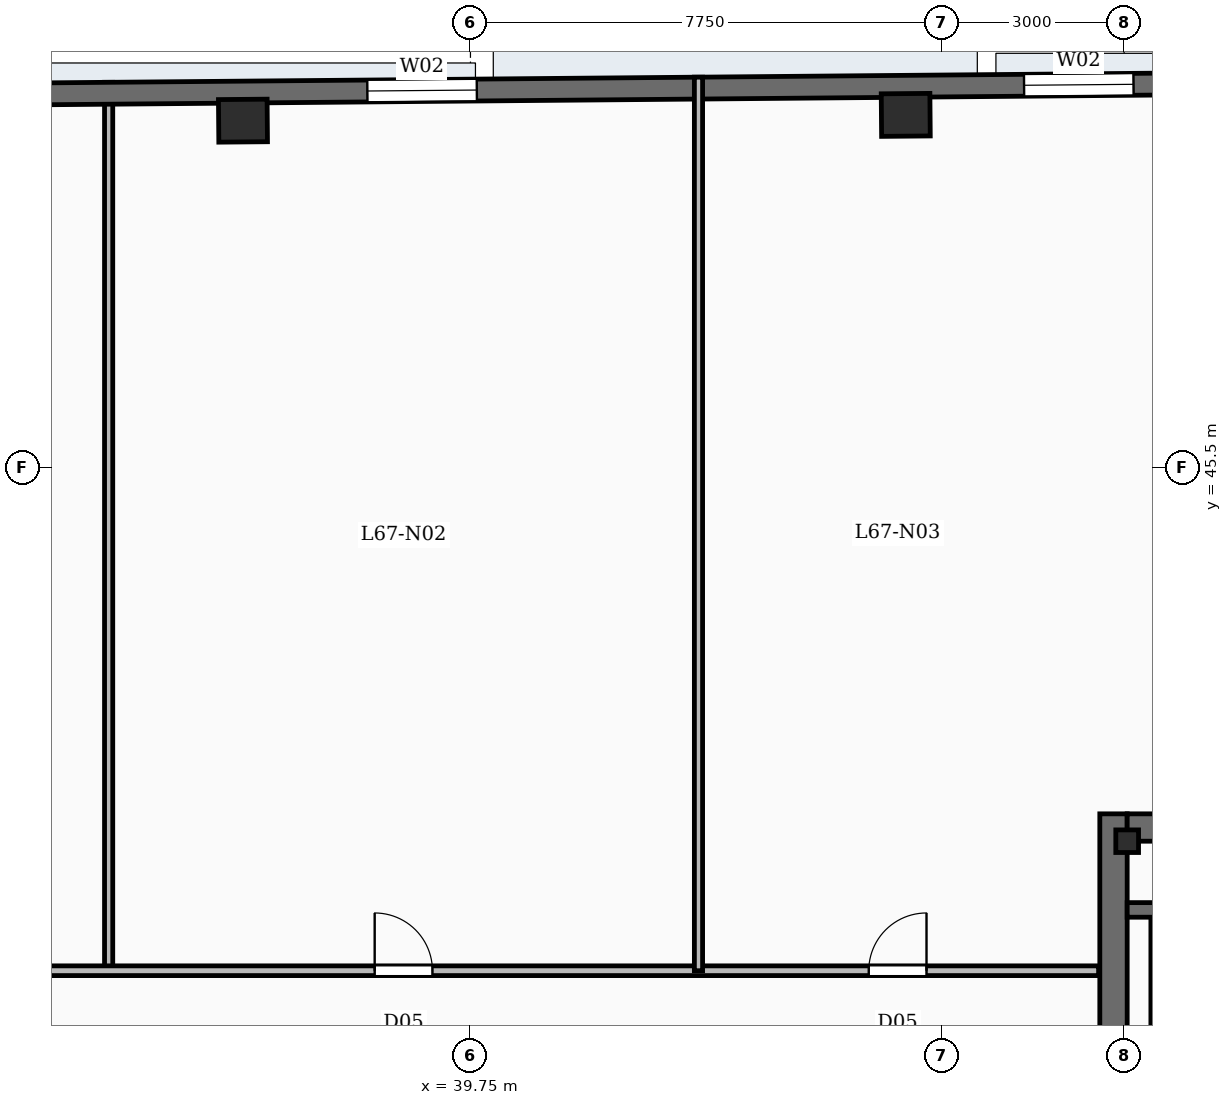
"""IFC4 building model, lengths in metres.
Left out: names, types, materials, properties, quantities, classifications, styles, units other than length and angle.
Written with IfcOpenShell. Run it as: python <this file> out.ifc"""

import sys

from ifc_helpers import new_model, si_unit, direction, frame, frame_2d, origin, origin_2d, place, context, subcontext, project, spatial, rectangle, i_section, extrude, element, fill, save


model = new_model("IFC4")
c1 = context("Model", 3, precision=1e-05, world=origin(), true_north=direction((0.0, 1.0)))
c2 = subcontext(c1, "Body", "Model", "MODEL_VIEW")
j1 = project(units=[si_unit("LENGTHUNIT", "METRE"), si_unit("PLANEANGLEUNIT", "RADIAN")], contexts=[c1])
p1 = place(None, origin())
s1 = spatial("IfcSite", under=j1, at=p1, CompositionType="ELEMENT")
p2 = place(p1, origin())
s2 = spatial("IfcBuilding", under=s1, at=p2, CompositionType="ELEMENT")
p3 = place(p2, frame((0.0, 0.0, 274.9)))
s3 = spatial("IfcBuildingStorey", under=s2, at=p3, CompositionType="ELEMENT", Elevation=274.9)
p4 = place(p3, frame((50.325, 19.0, -0.45), z_axis=(0.0, 0.0, 1.0), x_axis=(0.0, 1.0, 0.0)))
e1 = element("IfcWall", 1, at=p4, inside=s3, PredefinedType="SHEAR", context=c2, shape_type="SweptSolid", body=[
    extrude(rectangle(XDim=20.8, YDim=0.45, at=frame_2d((10.4, 0.0))), origin(), (0.0, 0.0, 1.0), 3.93),
])
p5 = place(p4, frame((2.5, 0.0, 0.45)))
e2 = element("IfcOpeningElement", 2, at=p5, cuts=e1, PredefinedType="OPENING", context=c2, shape_type="SweptSolid", body=[
    extrude(rectangle(XDim=1.05, YDim=2.15, at=frame_2d((0.525, 1.075))), frame((0.0, 0.235, 0.0), z_axis=(0.0, -1.0, 0.0), x_axis=(1.0, 0.0, 0.0)), (0.0, 0.0, 1.0), 0.47),
])
p6 = place(p4, frame((8.65, 0.0, 0.45)))
e3 = element("IfcOpeningElement", 3, at=p6, cuts=e1, PredefinedType="OPENING", context=c2, shape_type="SweptSolid", body=[
    extrude(rectangle(XDim=1.05, YDim=2.15, at=frame_2d((0.525, 1.075))), frame((0.0, 0.235, 0.0), z_axis=(0.0, -1.0, 0.0), x_axis=(1.0, 0.0, 0.0)), (0.0, 0.0, 1.0), 0.47),
])
p7 = place(p4, frame((14.62, 0.0, 0.45)))
e4 = element("IfcOpeningElement", 4, at=p7, cuts=e1, PredefinedType="OPENING", context=c2, shape_type="SweptSolid", body=[
    extrude(rectangle(XDim=1.1, YDim=2.15, at=frame_2d((0.55, 1.075))), frame((0.0, 0.235, 0.0), z_axis=(0.0, -1.0, 0.0), x_axis=(1.0, 0.0, 0.0)), (0.0, 0.0, 1.0), 0.47),
])
p8 = place(p3, frame((50.55, 39.575, -0.45), z_axis=(0.0, 0.0, 1.0), x_axis=(1.0, 0.0, 0.0)))
e5 = element("IfcWall", 5, at=p8, inside=s3, PredefinedType="SHEAR", context=c2, shape_type="SweptSolid", body=[
    extrude(rectangle(XDim=9.8, YDim=0.45, at=frame_2d((4.9, 0.0))), origin(), (0.0, 0.0, 1.0), 3.93),
])
p9 = place(p3, frame((50.55, 39.35, -0.45), z_axis=(0.0, 0.0, 1.0), x_axis=(1.0, 0.0, 0.0)))
e6 = element("IfcColumn", 6, at=p9, inside=s3, PredefinedType="COLUMN", context=c2, shape_type="SweptSolid", body=[
    extrude(i_section(OverallWidth=0.374, OverallDepth=0.372, WebThickness=0.016, FlangeThickness=0.026, FilletRadius=0.02, at=origin_2d()), origin(), (0.0, 0.0, 1.0), 3.93),
])
for number, where, z_axis, x_axis in (
    (7, (46.908, 51.294, -0.45), (0.0, 0.0, 1.0), (1.0, 0.009, 0.0)),
    (8, (36.009, 51.199, -0.45), (0.0, 0.0, 1.0), (1.0, 0.009, 0.0)),
):
    element("IfcColumn", number, at=place(p3, frame(where, z_axis=z_axis, x_axis=x_axis)), inside=s3, PredefinedType="COLUMN", context=c2, shape_type="SweptSolid", body=[
        extrude(rectangle(XDim=0.8, YDim=0.7, at=origin_2d()), origin(), (0.0, 0.0, 1.0), 3.93),
    ])
p10 = place(p3, frame((13.856, 51.476, 0.0), z_axis=(0.0, 0.0, 1.0), x_axis=(0.999961944954, 0.008724026757, 0.0)))
e9 = element("IfcWall", 9, at=p10, inside=s3, PredefinedType="SOLIDWALL", context=c2, shape_type="SweptSolid", body=[
    extrude(rectangle(XDim=44.3, YDim=0.36, at=frame_2d((22.15, 0.0))), origin(), (0.0, 0.0, 1.0), 3.48),
])
p11 = place(p10, frame((2.6, 0.0, 0.88)))
e10 = element("IfcOpeningElement", 10, at=p11, cuts=e9, PredefinedType="OPENING", context=c2, shape_type="SweptSolid", body=[
    extrude(rectangle(XDim=1.8, YDim=2.15, at=frame_2d((0.9, 1.075))), frame((0.0, 0.19, 0.0), z_axis=(0.0, -1.0, 0.0), x_axis=(1.0, 0.0, 0.0)), (0.0, 0.0, 1.0), 0.38),
])
p12 = place(p10, frame((8.0, 0.0, 0.88)))
e11 = element("IfcOpeningElement", 11, at=p12, cuts=e9, PredefinedType="OPENING", context=c2, shape_type="SweptSolid", body=[
    extrude(rectangle(XDim=1.8, YDim=2.15, at=frame_2d((0.9, 1.075))), frame((0.0, 0.19, 0.0), z_axis=(0.0, -1.0, 0.0), x_axis=(1.0, 0.0, 0.0)), (0.0, 0.0, 1.0), 0.38),
])
p13 = place(p10, frame((13.4, 0.0, 0.88)))
e12 = element("IfcOpeningElement", 12, at=p13, cuts=e9, PredefinedType="OPENING", context=c2, shape_type="SweptSolid", body=[
    extrude(rectangle(XDim=1.8, YDim=2.15, at=frame_2d((0.9, 1.075))), frame((0.0, 0.19, 0.0), z_axis=(0.0, -1.0, 0.0), x_axis=(1.0, 0.0, 0.0)), (0.0, 0.0, 1.0), 0.38),
])
p14 = place(p10, frame((24.2, 0.0, 0.88)))
e13 = element("IfcOpeningElement", 13, at=p14, cuts=e9, PredefinedType="OPENING", context=c2, shape_type="SweptSolid", body=[
    extrude(rectangle(XDim=1.8, YDim=2.15, at=frame_2d((0.9, 1.075))), frame((0.0, 0.19, 0.0), z_axis=(0.0, -1.0, 0.0), x_axis=(1.0, 0.0, 0.0)), (0.0, 0.0, 1.0), 0.38),
])
p15 = place(p10, frame((35.0, 0.0, 0.88)))
e14 = element("IfcOpeningElement", 14, at=p15, cuts=e9, PredefinedType="OPENING", context=c2, shape_type="SweptSolid", body=[
    extrude(rectangle(XDim=1.8, YDim=2.15, at=frame_2d((0.9, 1.075))), frame((0.0, 0.19, 0.0), z_axis=(0.0, -1.0, 0.0), x_axis=(1.0, 0.0, 0.0)), (0.0, 0.0, 1.0), 0.38),
])
p16 = place(p3, frame((50.55, 38.22, 0.0), z_axis=(0.0, 0.0, 1.0), x_axis=(1.0, 0.0, 0.0)))
e15 = element("IfcWall", 15, at=p16, inside=s3, PredefinedType="SOLIDWALL", context=c2, shape_type="SweptSolid", body=[
    extrude(rectangle(XDim=9.8, YDim=0.24, at=frame_2d((4.9, 0.0))), origin(), (0.0, 0.0, 1.0), 3.48),
])
p17 = place(p3, frame((51.06, 34.95, 0.0), z_axis=(0.0, 0.0, 1.0), x_axis=(0.0, 1.0, 0.0)))
e16 = element("IfcWall", 16, at=p17, inside=s3, PredefinedType="SOLIDWALL", context=c2, shape_type="SweptSolid", body=[
    extrude(rectangle(XDim=3.15, YDim=0.24, at=frame_2d((1.575, 0.0))), origin(), (0.0, 0.0, 1.0), 3.48),
])
p18 = place(p3, frame((33.8, 37.22, 0.0), z_axis=(0.0, 0.0, 1.0), x_axis=(0.0, 1.0, 0.0)))
e17 = element("IfcWall", 17, at=p18, inside=s3, PredefinedType="PARTITIONING", context=c2, shape_type="SweptSolid", body=[
    extrude(rectangle(XDim=14.61, YDim=0.135, at=frame_2d((7.305, 0.0))), origin(), (0.0, 0.0, 1.0), 2.54),
])
p19 = place(p3, frame((43.5, 37.22, 0.0), z_axis=(0.0, 0.0, 1.0), x_axis=(0.0, 1.0, 0.0)))
e18 = element("IfcWall", 18, at=p19, inside=s3, PredefinedType="PARTITIONING", context=c2, shape_type="SweptSolid", body=[
    extrude(rectangle(XDim=14.695, YDim=0.135, at=frame_2d((7.347, 0.0))), origin(), (0.0, 0.0, 1.0), 2.54),
])
p20 = place(p3, frame((24.82, 37.22, 0.0), z_axis=(0.0, 0.0, 1.0), x_axis=(1.0, 0.0, 0.0)))
e19 = element("IfcWall", 19, at=p20, inside=s3, PredefinedType="PARTITIONING", context=c2, shape_type="SweptSolid", body=[
    extrude(rectangle(XDim=25.26, YDim=0.16, at=frame_2d((12.63, 0.0))), origin(), (0.0, 0.0, 1.0), 2.54),
])
p21 = place(p20, frame((4.03, 0.0, 0.0)))
e20 = element("IfcOpeningElement", 20, at=p21, cuts=e19, PredefinedType="OPENING", context=c2, shape_type="SweptSolid", body=[
    extrude(rectangle(XDim=0.95, YDim=2.15, at=frame_2d((0.475, 1.075))), frame((0.0, 0.09, 0.0), z_axis=(0.0, -1.0, 0.0), x_axis=(1.0, 0.0, 0.0)), (0.0, 0.0, 1.0), 0.18),
])
p22 = place(p20, frame((13.355, 0.0, 0.0)))
e21 = element("IfcOpeningElement", 21, at=p22, cuts=e19, PredefinedType="OPENING", context=c2, shape_type="SweptSolid", body=[
    extrude(rectangle(XDim=0.95, YDim=2.15, at=frame_2d((0.475, 1.075))), frame((0.0, 0.09, 0.0), z_axis=(0.0, -1.0, 0.0), x_axis=(1.0, 0.0, 0.0)), (0.0, 0.0, 1.0), 0.18),
])
p23 = place(p20, frame((21.48, 0.0, 0.0)))
e22 = element("IfcOpeningElement", 22, at=p23, cuts=e19, PredefinedType="OPENING", context=c2, shape_type="SweptSolid", body=[
    extrude(rectangle(XDim=0.95, YDim=2.15, at=frame_2d((0.475, 1.075))), frame((0.0, 0.09, 0.0), z_axis=(0.0, -1.0, 0.0), x_axis=(1.0, 0.0, 0.0)), (0.0, 0.0, 1.0), 0.18),
])
p24 = place(p14, origin())
e23 = element("IfcWindow", 23, at=p24, inside=s3, PartitioningType="DOUBLE_PANEL_VERTICAL", PredefinedType="WINDOW", context=c2, shape_type="SweptSolid", body=[
    extrude(rectangle(XDim=1.8, YDim=2.15, at=frame_2d((0.9, 1.075))), frame((0.0, 0.03, 0.0), z_axis=(0.0, -1.0, 0.0), x_axis=(1.0, 0.0, 0.0)), (0.0, 0.0, 1.0), 0.06),
])
fill(e13, e23)
p25 = place(p15, origin())
e24 = element("IfcWindow", 24, at=p25, inside=s3, PartitioningType="DOUBLE_PANEL_VERTICAL", PredefinedType="WINDOW", context=c2, shape_type="SweptSolid", body=[
    extrude(rectangle(XDim=1.8, YDim=2.15, at=frame_2d((0.9, 1.075))), frame((0.0, 0.03, 0.0), z_axis=(0.0, -1.0, 0.0), x_axis=(1.0, 0.0, 0.0)), (0.0, 0.0, 1.0), 0.06),
])
fill(e14, e24)
p26 = place(p22, origin())
e25 = element("IfcDoor", 25, at=p26, inside=s3, OperationType="SINGLE_SWING_LEFT", PredefinedType="DOOR", context=c2, shape_type="SweptSolid", body=[
    extrude(rectangle(XDim=0.95, YDim=2.15, at=frame_2d((0.475, 1.075))), frame((0.0, 0.025, 0.0), z_axis=(0.0, -1.0, 0.0), x_axis=(1.0, 0.0, 0.0)), (0.0, 0.0, 1.0), 0.05),
])
fill(e21, e25)
p27 = place(p23, origin())
e26 = element("IfcDoor", 26, at=p27, inside=s3, OperationType="SINGLE_SWING_RIGHT", PredefinedType="DOOR", context=c2, shape_type="SweptSolid", body=[
    extrude(rectangle(XDim=0.95, YDim=2.15, at=frame_2d((0.475, 1.075))), frame((0.0, 0.025, 0.0), z_axis=(0.0, -1.0, 0.0), x_axis=(1.0, 0.0, 0.0)), (0.0, 0.0, 1.0), 0.05),
])
fill(e22, e26)
save(model, sys.argv[1])
